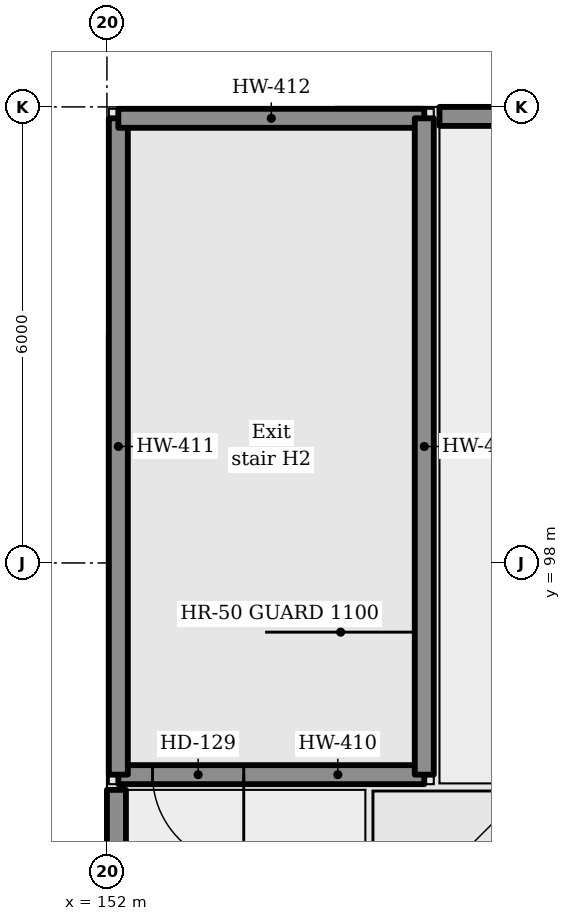
"""IFC4 building model, lengths in metres.
Left out: names, types, materials, properties, quantities, classifications, styles, units other than length and angle.
Written with IfcOpenShell. Run it as: python <this file> out.ifc"""

import sys

from ifc_helpers import new_model, si_unit, direction, frame, frame_2d, origin, origin_2d, place, context, subcontext, project, spatial, rectangle, extrude, element, fill, save


model = new_model("IFC4")
c1 = context("Model", 3, precision=1e-05, world=origin(), true_north=direction((0.0, 1.0)))
c2 = subcontext(c1, "Body", "Model", "MODEL_VIEW")
j1 = project(units=[si_unit("LENGTHUNIT", "METRE"), si_unit("PLANEANGLEUNIT", "RADIAN")], contexts=[c1])
p1 = place(None, origin())
s1 = spatial("IfcSite", under=j1, at=p1, CompositionType="ELEMENT")
p2 = place(p1, origin())
s2 = spatial("IfcBuilding", under=s1, at=p2, CompositionType="ELEMENT")
p3 = place(p2, frame((0.0, 0.0, 19.8)))
s3 = spatial("IfcBuildingStorey", under=s2, at=p3, CompositionType="ELEMENT", Elevation=19.8)
p4 = place(p3, frame((152.125, 64.985, 0.0), z_axis=(0.0, 0.0, 1.0), x_axis=(0.0, 1.0, 0.0)))
e1 = element("IfcWall", 1, at=p4, inside=s3, PredefinedType="PARAPET", context=c2, shape_type="SweptSolid", body=[
    extrude(rectangle(XDim=30.03, YDim=0.25, at=frame_2d((15.015, 0.0))), origin(), (0.0, 0.0, 1.0), 1.1),
])
p5 = place(p3, frame((156.375, 103.875, 0.0), z_axis=(0.0, 0.0, 1.0), x_axis=(1.0, 0.0, 0.0)))
e2 = element("IfcWall", 2, at=p5, inside=s3, PredefinedType="PARAPET", context=c2, shape_type="SweptSolid", body=[
    extrude(rectangle(XDim=57.25, YDim=0.25, at=frame_2d((28.625, 0.0))), origin(), (0.0, 0.0, 1.0), 1.1),
])
p6 = place(p3, frame((156.175, 95.215, 0.0), z_axis=(0.0, 0.0, 1.0), x_axis=(-1.0, 0.0, 0.0)))
e3 = element("IfcWall", 3, at=p6, inside=s3, PredefinedType="SOLIDWALL", context=c2, shape_type="SweptSolid", body=[
    extrude(rectangle(XDim=4.025, YDim=0.25, at=frame_2d((2.013, 0.0))), origin(), (0.0, 0.0, 1.0), 2.75),
])
p7 = place(p6, frame((2.375, 0.0, 0.0)))
e4 = element("IfcOpeningElement", 4, at=p7, cuts=e3, PredefinedType="OPENING", context=c2, shape_type="SweptSolid", body=[
    extrude(rectangle(XDim=1.2, YDim=2.1, at=frame_2d((0.6, 1.05))), frame((0.0, 0.135, 0.0), z_axis=(0.0, -1.0, 0.0), x_axis=(1.0, 0.0, 0.0)), (0.0, 0.0, 1.0), 0.27),
])
p8 = place(p3, frame((152.15, 95.215, 0.0), z_axis=(0.0, 0.0, 1.0), x_axis=(0.0, 1.0, 0.0)))
e5 = element("IfcWall", 5, at=p8, inside=s3, PredefinedType="SOLIDWALL", context=c2, shape_type="SweptSolid", body=[
    extrude(rectangle(XDim=8.635, YDim=0.25, at=frame_2d((4.317, 0.0))), origin(), (0.0, 0.0, 1.0), 2.75),
])
p9 = place(p3, frame((152.15, 103.85, 0.0), z_axis=(0.0, 0.0, 1.0), x_axis=(1.0, 0.0, 0.0)))
e6 = element("IfcWall", 6, at=p9, inside=s3, PredefinedType="SOLIDWALL", context=c2, shape_type="SweptSolid", body=[
    extrude(rectangle(XDim=4.025, YDim=0.25, at=frame_2d((2.013, 0.0))), origin(), (0.0, 0.0, 1.0), 2.75),
])
p10 = place(p3, frame((156.175, 103.85, 0.0), z_axis=(0.0, 0.0, 1.0), x_axis=(0.0, -1.0, 0.0)))
e7 = element("IfcWall", 7, at=p10, inside=s3, PredefinedType="SOLIDWALL", context=c2, shape_type="SweptSolid", body=[
    extrude(rectangle(XDim=8.635, YDim=0.25, at=frame_2d((4.317, 0.0))), origin(), (0.0, 0.0, 1.0), 2.75),
])
p11 = place(p3, frame((0.0, 0.0, -0.35)))
p12 = place(p11, frame((156.5, 94.0, 0.0)))
p13 = place(p12, frame((0.0, 0.0, 0.3)))
e8 = element("IfcWindow", 8, at=p13, inside=s3, PartitioningType="SINGLE_PANEL", PredefinedType="SKYLIGHT", context=c2, shape_type="SweptSolid", body=[
    extrude(rectangle(XDim=2.0, YDim=2.0, at=origin_2d()), origin(), (0.0, 0.0, 1.0), 0.05),
])
p14 = place(p7, frame((1.2, 0.0, 0.0), z_axis=(0.0, 0.0, 1.0), x_axis=(-1.0, 0.0, 0.0)))
e9 = element("IfcDoor", 9, at=p14, inside=s3, OperationType="SINGLE_SWING_LEFT", PredefinedType="DOOR", context=c2, shape_type="SweptSolid", body=[
    extrude(rectangle(XDim=1.2, YDim=2.1, at=frame_2d((0.6, 1.05))), frame((0.0, 0.025, 0.0), z_axis=(0.0, -1.0, 0.0), x_axis=(1.0, 0.0, 0.0)), (0.0, 0.0, 1.0), 0.05),
])
fill(e4, e9)
save(model, sys.argv[1])
